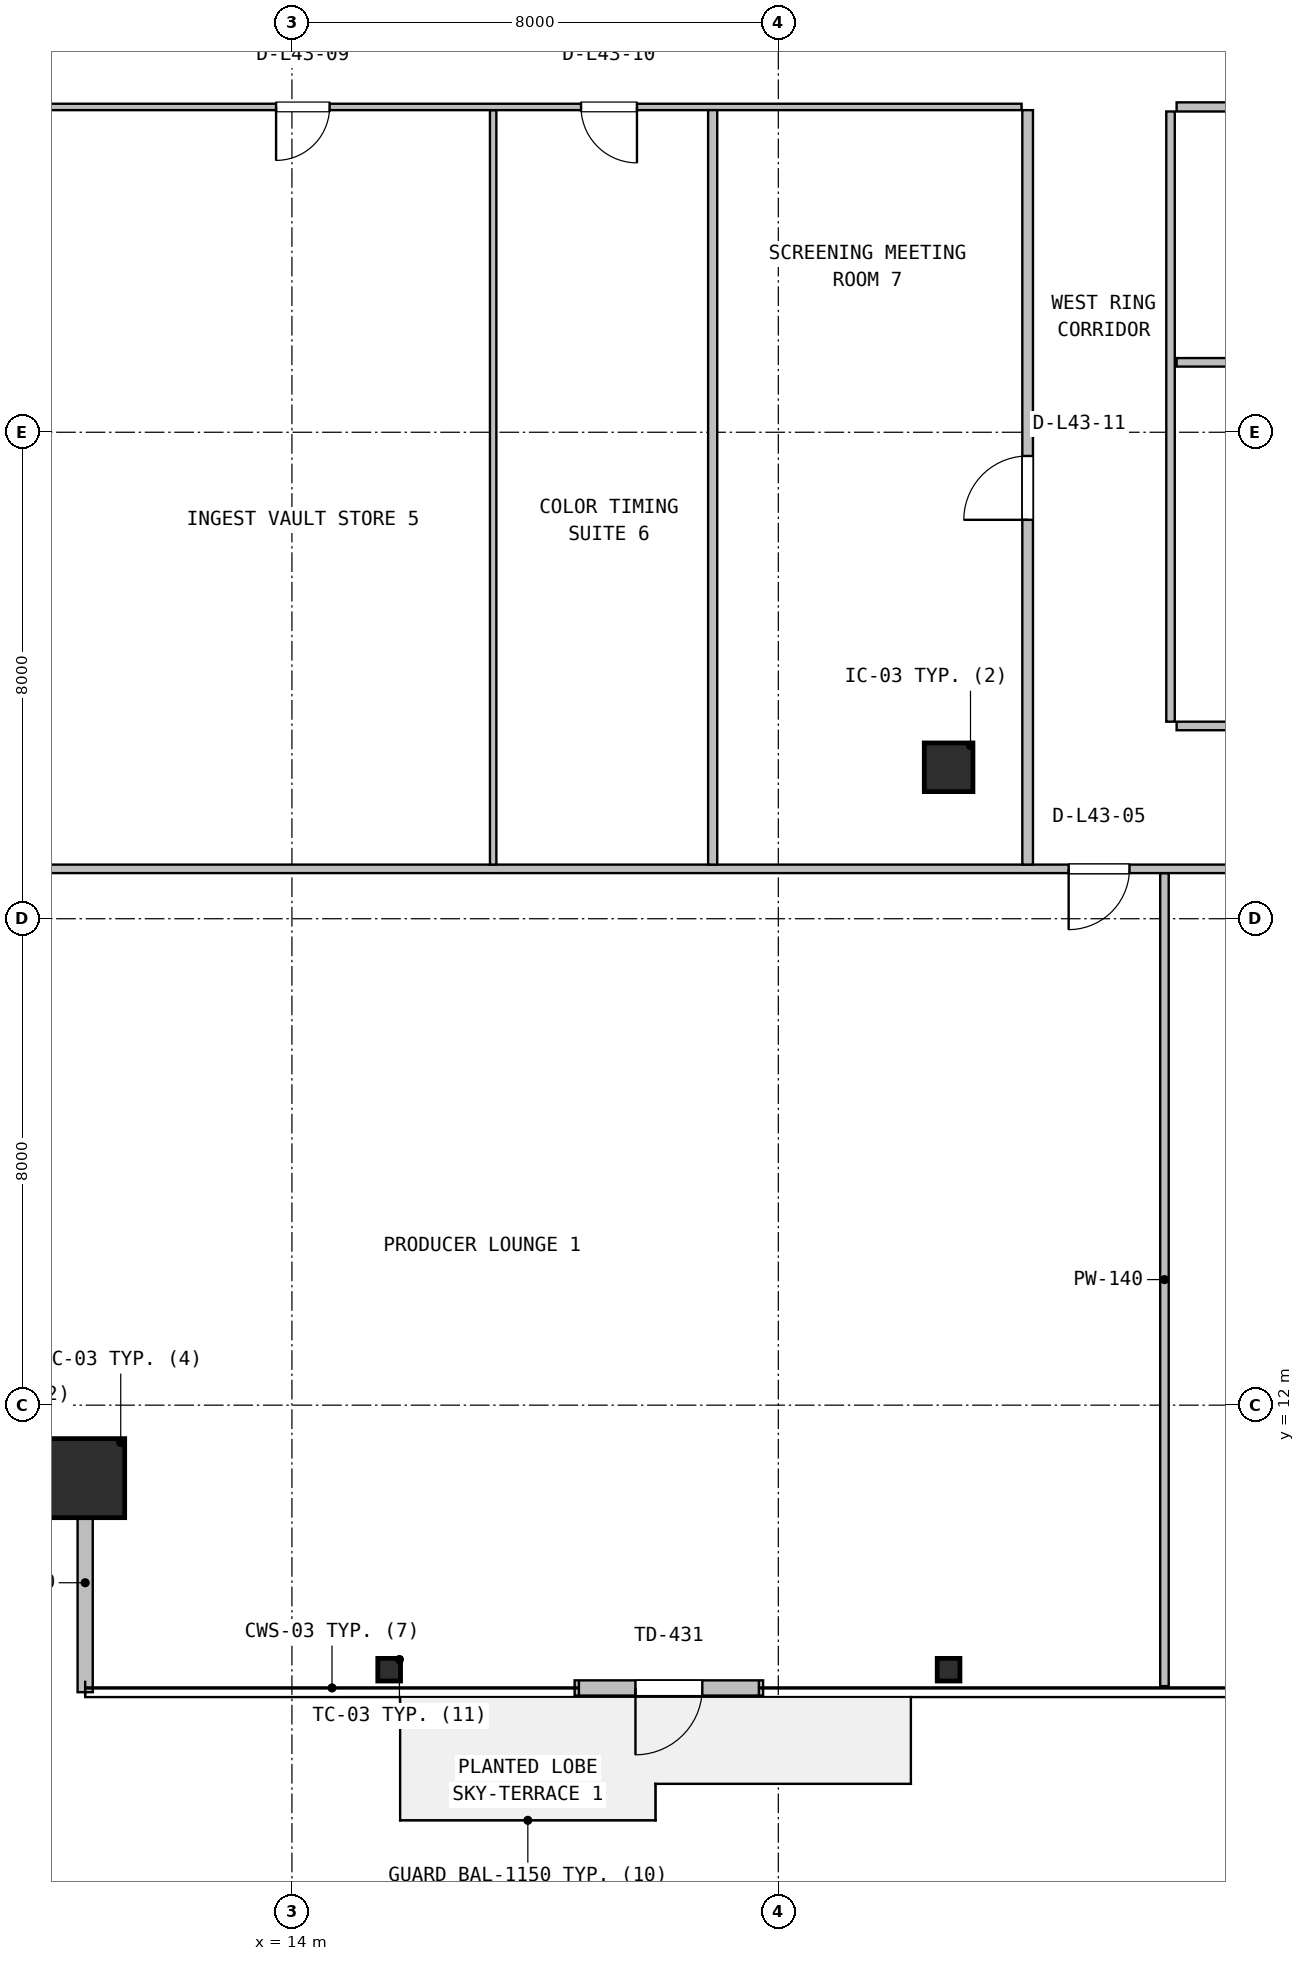
"""IFC4 building model, lengths in metres.
Left out: names, types, materials, properties, quantities, classifications, styles, units other than length and angle.
Written with IfcOpenShell. Run it as: python <this file> out.ifc"""

import sys

from ifc_helpers import new_model, si_unit, direction, frame, frame_2d, origin, origin_2d, place, context, subcontext, project, spatial, rectangle, hollow_rectangle, i_section, extrude, source, transform, mapped, element, fill, save


model = new_model("IFC4")
c1 = context("Model", 3, precision=1e-05, world=origin(), true_north=direction((0.0, 1.0)))
c2 = subcontext(c1, "Body", "Model", "MODEL_VIEW")
j1 = project(units=[si_unit("LENGTHUNIT", "METRE"), si_unit("PLANEANGLEUNIT", "RADIAN")], contexts=[c1])
p1 = place(None, origin())
s1 = spatial("IfcSite", under=j1, at=p1, CompositionType="ELEMENT")
p2 = place(p1, origin())
s2 = spatial("IfcBuilding", under=s1, at=p2, CompositionType="ELEMENT")
p3 = place(p2, frame((0.0, 0.0, 176.2)))
s3 = spatial("IfcBuildingStorey", under=s2, at=p3, CompositionType="ELEMENT", Elevation=176.2)
m1 = source(origin(), c2, "Body", "SweptSolid", [
    extrude(hollow_rectangle(XDim=1.3, YDim=1.3, WallThickness=0.05, at=origin_2d()), origin(), (0.0, 0.0, 1.0), 3.8),
])
p4 = place(p3, frame((10.6, 10.8, 0.0), z_axis=(0.0, 0.0, 1.0), x_axis=(1.0, 0.0, 0.0)))
e1 = element("IfcColumn", 1, at=p4, inside=s3, PredefinedType="COLUMN", context=c2, shape_type="MappedRepresentation", body=[
    mapped(m1, transform((0.0, 0.0, 0.0), x_axis=(1.0, 0.0, 0.0), y_axis=(0.0, 1.0, 0.0), z_axis=(0.0, 0.0, 1.0), scale=1.0)),
])
m2 = source(origin(), c2, "Body", "SweptSolid", [
    extrude(i_section(OverallWidth=0.374, OverallDepth=0.372, WebThickness=0.016, FlangeThickness=0.026, FilletRadius=0.016, at=origin_2d()), origin(), (0.0, 0.0, 1.0), 3.8),
])
for number, where, z_axis, x_axis in (
    (2, (15.6, 7.65, 0.0), (0.0, 0.0, 1.0), (1.0, 0.0, 0.0)),
    (3, (24.8, 7.65, 0.0), (0.0, 0.0, 1.0), (1.0, 0.0, 0.0)),
):
    element("IfcColumn", number, at=place(p3, frame(where, z_axis=z_axis, x_axis=x_axis)), inside=s3, PredefinedType="COLUMN", context=c2, shape_type="MappedRepresentation", body=[
        mapped(m2, transform((0.0, 0.0, 0.0), x_axis=(1.0, 0.0, 0.0), y_axis=(0.0, 1.0, 0.0), z_axis=(0.0, 0.0, 1.0), scale=1.0)),
    ])
m3 = source(origin(), c2, "Body", "SweptSolid", [
    extrude(rectangle(XDim=0.8, YDim=0.8, at=origin_2d()), origin(), (0.0, 0.0, 1.0), 3.8),
])
p5 = place(p3, frame((24.8, 22.49, 0.0), z_axis=(0.0, 0.0, 1.0), x_axis=(1.0, 0.0, 0.0)))
e4 = element("IfcColumn", 4, at=p5, inside=s3, PredefinedType="COLUMN", context=c2, shape_type="MappedRepresentation", body=[
    mapped(m3, transform((0.0, 0.0, 0.0), x_axis=(1.0, 0.0, 0.0), y_axis=(0.0, 1.0, 0.0), z_axis=(0.0, 0.0, 1.0), scale=1.0)),
])
p6 = place(p3, frame((18.65, 7.35, 0.0), z_axis=(0.0, 0.0, 1.0), x_axis=(1.0, 0.0, 0.0)))
e5 = element("IfcWall", 5, at=p6, inside=s3, PredefinedType="SOLIDWALL", context=c2, shape_type="SweptSolid", body=[
    extrude(rectangle(XDim=3.1, YDim=0.25, at=frame_2d((1.55, 0.0))), origin(), (0.0, 0.0, 1.0), 3.53),
])
p7 = place(p6, frame((1.0, 0.0, 0.0)))
e6 = element("IfcOpeningElement", 6, at=p7, cuts=e5, PredefinedType="OPENING", context=c2, shape_type="SweptSolid", body=[
    extrude(rectangle(XDim=1.1, YDim=2.15, at=frame_2d((0.55, 1.075))), frame((0.0, 0.135, 0.0), z_axis=(0.0, -1.0, 0.0), x_axis=(1.0, 0.0, 0.0)), (0.0, 0.0, 1.0), 0.27),
])
p8 = place(p3, frame((10.6, 7.28, 0.0), z_axis=(0.0, 0.0, 1.0), x_axis=(0.0, 1.0, 0.0)))
e7 = element("IfcWall", 7, at=p8, inside=s3, PredefinedType="SOLIDWALL", context=c2, shape_type="SweptSolid", body=[
    extrude(rectangle(XDim=3.6, YDim=0.25, at=frame_2d((1.8, 0.0))), origin(), (0.0, 0.0, 1.0), 3.108),
])
p9 = place(p3, frame((28.35, 7.38, 0.0), z_axis=(0.0, 0.0, 1.0), x_axis=(0.0, 1.0, 0.0)))
e8 = element("IfcWall", 8, at=p9, inside=s3, PredefinedType="PARTITIONING", context=c2, shape_type="SweptSolid", body=[
    extrude(rectangle(XDim=13.37, YDim=0.14, at=frame_2d((6.685, 0.0))), origin(), (0.0, 0.0, 1.0), 3.108),
])
p10 = place(p3, frame((7.18, 20.82, 0.0), z_axis=(0.0, 0.0, 1.0), x_axis=(1.0, 0.0, 0.0)))
e9 = element("IfcWall", 9, at=p10, inside=s3, PredefinedType="PARTITIONING", context=c2, shape_type="SweptSolid", body=[
    extrude(rectangle(XDim=53.64, YDim=0.14, at=frame_2d((26.82, 0.0))), origin(), (0.0, 0.0, 1.0), 2.909),
])
p11 = place(p10, frame((19.595, 0.0, 0.0)))
e10 = element("IfcOpeningElement", 10, at=p11, cuts=e9, PredefinedType="OPENING", context=c2, shape_type="SweptSolid", body=[
    extrude(rectangle(XDim=1.0, YDim=2.1, at=frame_2d((0.5, 1.05))), frame((0.0, 0.08, 0.0), z_axis=(0.0, -1.0, 0.0), x_axis=(1.0, 0.0, 0.0)), (0.0, 0.0, 1.0), 0.16),
])
p12 = place(p10, frame((24.15, 0.0, 0.0)))
e11 = element("IfcOpeningElement", 11, at=p12, cuts=e9, PredefinedType="OPENING", context=c2, shape_type="SweptSolid", body=[
    extrude(rectangle(XDim=0.88, YDim=2.06, at=frame_2d((0.44, 1.03))), frame((0.0, 0.08, 0.0), z_axis=(0.0, -1.0, 0.0), x_axis=(1.0, 0.0, 0.0)), (0.0, 0.0, 1.0), 0.16),
])
p13 = place(p10, frame((32.42, 0.0, 0.0)))
e12 = element("IfcOpeningElement", 12, at=p13, cuts=e9, PredefinedType="OPENING", context=c2, shape_type="SweptSolid", body=[
    extrude(rectangle(XDim=0.88, YDim=2.06, at=frame_2d((0.44, 1.03))), frame((0.0, 0.08, 0.0), z_axis=(0.0, -1.0, 0.0), x_axis=(1.0, 0.0, 0.0)), (0.0, 0.0, 1.0), 0.16),
])
p14 = place(p10, frame((38.545, 0.0, 0.0)))
e13 = element("IfcOpeningElement", 13, at=p14, cuts=e9, PredefinedType="OPENING", context=c2, shape_type="SweptSolid", body=[
    extrude(rectangle(XDim=0.88, YDim=2.06, at=frame_2d((0.44, 1.03))), frame((0.0, 0.08, 0.0), z_axis=(0.0, -1.0, 0.0), x_axis=(1.0, 0.0, 0.0)), (0.0, 0.0, 1.0), 0.16),
])
p15 = place(p3, frame((17.31, 20.89, 0.0), z_axis=(0.0, 0.0, 1.0), x_axis=(0.0, 1.0, 0.0)))
e14 = element("IfcWall", 14, at=p15, inside=s3, PredefinedType="PARTITIONING", context=c2, shape_type="SweptSolid", body=[
    extrude(rectangle(XDim=12.407, YDim=0.105, at=frame_2d((6.204, 0.0))), origin(), (0.0, 0.0, 1.0), 3.222),
])
p16 = place(p3, frame((7.18, 33.35, 0.0), z_axis=(0.0, 0.0, 1.0), x_axis=(1.0, 0.0, 0.0)))
e15 = element("IfcWall", 15, at=p16, inside=s3, PredefinedType="PARTITIONING", context=c2, shape_type="SweptSolid", body=[
    extrude(rectangle(XDim=18.82, YDim=0.105, at=frame_2d((9.41, 0.0))), origin(), (0.0, 0.0, 1.0), 2.909),
])
p17 = place(p16, frame((6.56, 0.0, 0.0)))
e16 = element("IfcOpeningElement", 16, at=p17, cuts=e15, PredefinedType="OPENING", context=c2, shape_type="SweptSolid", body=[
    extrude(rectangle(XDim=0.88, YDim=2.06, at=frame_2d((0.44, 1.03))), frame((0.0, 0.062, 0.0), z_axis=(0.0, -1.0, 0.0), x_axis=(1.0, 0.0, 0.0)), (0.0, 0.0, 1.0), 0.125),
])
p18 = place(p16, frame((11.575, 0.0, 0.0)))
e17 = element("IfcOpeningElement", 17, at=p18, cuts=e15, PredefinedType="OPENING", context=c2, shape_type="SweptSolid", body=[
    extrude(rectangle(XDim=0.92, YDim=2.08, at=frame_2d((0.46, 1.04))), frame((0.0, 0.062, 0.0), z_axis=(0.0, -1.0, 0.0), x_axis=(1.0, 0.0, 0.0)), (0.0, 0.0, 1.0), 0.125),
])
p19 = place(p3, frame((20.92, 20.89, 0.0), z_axis=(0.0, 0.0, 1.0), x_axis=(0.0, 1.0, 0.0)))
e18 = element("IfcWall", 18, at=p19, inside=s3, PredefinedType="PARTITIONING", context=c2, shape_type="SweptSolid", body=[
    extrude(rectangle(XDim=12.407, YDim=0.15, at=frame_2d((6.204, 0.0))), origin(), (0.0, 0.0, 1.0), 3.222),
])
p20 = place(p3, frame((26.1, 20.89, 0.0), z_axis=(0.0, 0.0, 1.0), x_axis=(0.0, 1.0, 0.0)))
e19 = element("IfcWall", 19, at=p20, inside=s3, PredefinedType="PARTITIONING", context=c2, shape_type="SweptSolid", body=[
    extrude(rectangle(XDim=12.407, YDim=0.175, at=frame_2d((6.204, 0.0))), origin(), (0.0, 0.0, 1.0), 2.909),
])
p21 = place(p20, frame((5.67, 0.0, 0.0)))
e20 = element("IfcOpeningElement", 20, at=p21, cuts=e19, PredefinedType="OPENING", context=c2, shape_type="SweptSolid", body=[
    extrude(rectangle(XDim=1.05, YDim=2.1, at=frame_2d((0.525, 1.05))), frame((0.0, 0.098, 0.0), z_axis=(0.0, -1.0, 0.0), x_axis=(1.0, 0.0, 0.0)), (0.0, 0.0, 1.0), 0.195),
])
p22 = place(p3, frame((28.55, 23.17, 0.0), z_axis=(0.0, 0.0, 1.0), x_axis=(1.0, 0.0, 0.0)))
e21 = element("IfcWall", 21, at=p22, inside=s3, PredefinedType="PARTITIONING", context=c2, shape_type="SweptSolid", body=[
    extrude(rectangle(XDim=16.34, YDim=0.14, at=frame_2d((8.17, 0.0))), origin(), (0.0, 0.0, 1.0), 2.909),
])
p23 = place(p22, frame((7.67, 0.0, 0.0)))
e22 = element("IfcOpeningElement", 22, at=p23, cuts=e21, PredefinedType="OPENING", context=c2, shape_type="SweptSolid", body=[
    extrude(rectangle(XDim=1.0, YDim=2.1, at=frame_2d((0.5, 1.05))), frame((0.0, 0.08, 0.0), z_axis=(0.0, -1.0, 0.0), x_axis=(1.0, 0.0, 0.0)), (0.0, 0.0, 1.0), 0.16),
])
p24 = place(p3, frame((28.55, 29.15, 0.0), z_axis=(0.0, 0.0, 1.0), x_axis=(1.0, 0.0, 0.0)))
e23 = element("IfcWall", 23, at=p24, inside=s3, PredefinedType="PARTITIONING", context=c2, shape_type="SweptSolid", body=[
    extrude(rectangle(XDim=16.34, YDim=0.14, at=frame_2d((8.17, 0.0))), origin(), (0.0, 0.0, 1.0), 2.909),
])
p25 = place(p3, frame((28.45, 23.24, 0.0), z_axis=(0.0, 0.0, 1.0), x_axis=(0.0, 1.0, 0.0)))
e24 = element("IfcWall", 24, at=p25, inside=s3, PredefinedType="PARTITIONING", context=c2, shape_type="SweptSolid", body=[
    extrude(rectangle(XDim=10.035, YDim=0.14, at=frame_2d((5.018, 0.0))), origin(), (0.0, 0.0, 1.0), 3.222),
])
p26 = place(p3, frame((28.55, 33.35, 0.0), z_axis=(0.0, 0.0, 1.0), x_axis=(1.0, 0.0, 0.0)))
e25 = element("IfcWall", 25, at=p26, inside=s3, PredefinedType="PARTITIONING", context=c2, shape_type="SweptSolid", body=[
    extrude(rectangle(XDim=16.34, YDim=0.15, at=frame_2d((8.17, 0.0))), origin(), (0.0, 0.0, 1.0), 2.909),
])
p27 = place(p26, frame((7.73, 0.0, 0.0)))
e26 = element("IfcOpeningElement", 26, at=p27, cuts=e25, PredefinedType="OPENING", context=c2, shape_type="SweptSolid", body=[
    extrude(rectangle(XDim=0.88, YDim=2.06, at=frame_2d((0.44, 1.03))), frame((0.0, 0.085, 0.0), z_axis=(0.0, -1.0, 0.0), x_axis=(1.0, 0.0, 0.0)), (0.0, 0.0, 1.0), 0.17),
])
m4 = source(origin(), c2, "Body", "SweptSolid", [
    extrude(rectangle(XDim=1.1, YDim=2.15, at=frame_2d((0.55, 1.075))), frame((0.0, 0.025, 0.0), z_axis=(0.0, -1.0, 0.0), x_axis=(1.0, 0.0, 0.0)), (0.0, 0.0, 1.0), 0.05),
])
p28 = place(p7, frame((1.1, 0.0, 0.0), z_axis=(0.0, 0.0, 1.0), x_axis=(-1.0, 0.0, 0.0)))
e27 = element("IfcDoor", 27, at=p28, inside=s3, OperationType="SINGLE_SWING_LEFT", PredefinedType="DOOR", context=c2, shape_type="MappedRepresentation", body=[
    mapped(m4, transform((0.0, 0.0, 0.0), x_axis=(1.0, 0.0, 0.0), y_axis=(0.0, 1.0, 0.0), z_axis=(0.0, 0.0, 1.0), scale=1.0)),
])
fill(e6, e27)
m5 = source(origin(), c2, "Body", "SweptSolid", [
    extrude(rectangle(XDim=1.0, YDim=2.1, at=frame_2d((0.5, 1.05))), frame((0.0, 0.025, 0.0), z_axis=(0.0, -1.0, 0.0), x_axis=(1.0, 0.0, 0.0)), (0.0, 0.0, 1.0), 0.05),
])
p29 = place(p11, frame((1.0, 0.0, 0.0), z_axis=(0.0, 0.0, 1.0), x_axis=(-1.0, 0.0, 0.0)))
e28 = element("IfcDoor", 28, at=p29, inside=s3, OperationType="SINGLE_SWING_LEFT", PredefinedType="DOOR", context=c2, shape_type="MappedRepresentation", body=[
    mapped(m5, transform((0.0, 0.0, 0.0), x_axis=(1.0, 0.0, 0.0), y_axis=(0.0, 1.0, 0.0), z_axis=(0.0, 0.0, 1.0), scale=1.0)),
])
fill(e10, e28)
m6 = source(origin(), c2, "Body", "SweptSolid", [
    extrude(rectangle(XDim=0.88, YDim=2.06, at=frame_2d((0.44, 1.03))), frame((0.0, 0.025, 0.0), z_axis=(0.0, -1.0, 0.0), x_axis=(1.0, 0.0, 0.0)), (0.0, 0.0, 1.0), 0.05),
])
p30 = place(p17, frame((0.88, 0.0, 0.0), z_axis=(0.0, 0.0, 1.0), x_axis=(-1.0, 0.0, 0.0)))
e29 = element("IfcDoor", 29, at=p30, inside=s3, OperationType="SINGLE_SWING_LEFT", PredefinedType="DOOR", context=c2, shape_type="MappedRepresentation", body=[
    mapped(m6, transform((0.0, 0.0, 0.0), x_axis=(1.0, 0.0, 0.0), y_axis=(0.0, 1.0, 0.0), z_axis=(0.0, 0.0, 1.0), scale=1.0)),
])
fill(e16, e29)
m7 = source(origin(), c2, "Body", "SweptSolid", [
    extrude(rectangle(XDim=0.92, YDim=2.08, at=frame_2d((0.46, 1.04))), frame((0.0, 0.025, 0.0), z_axis=(0.0, -1.0, 0.0), x_axis=(1.0, 0.0, 0.0)), (0.0, 0.0, 1.0), 0.05),
])
p31 = place(p18, frame((0.92, 0.0, 0.0), z_axis=(0.0, 0.0, 1.0), x_axis=(-1.0, 0.0, 0.0)))
e30 = element("IfcDoor", 30, at=p31, inside=s3, OperationType="SINGLE_SWING_RIGHT", PredefinedType="DOOR", context=c2, shape_type="MappedRepresentation", body=[
    mapped(m7, transform((0.0, 0.0, 0.0), x_axis=(1.0, 0.0, 0.0), y_axis=(0.0, 1.0, 0.0), z_axis=(0.0, 0.0, 1.0), scale=1.0)),
])
fill(e17, e30)
m8 = source(origin(), c2, "Body", "SweptSolid", [
    extrude(rectangle(XDim=1.05, YDim=2.1, at=frame_2d((0.525, 1.05))), frame((0.0, 0.025, 0.0), z_axis=(0.0, -1.0, 0.0), x_axis=(1.0, 0.0, 0.0)), (0.0, 0.0, 1.0), 0.05),
])
p32 = place(p21, origin())
e31 = element("IfcDoor", 31, at=p32, inside=s3, OperationType="SINGLE_SWING_LEFT", PredefinedType="DOOR", context=c2, shape_type="MappedRepresentation", body=[
    mapped(m8, transform((0.0, 0.0, 0.0), x_axis=(1.0, 0.0, 0.0), y_axis=(0.0, 1.0, 0.0), z_axis=(0.0, 0.0, 1.0), scale=1.0)),
])
fill(e20, e31)
save(model, sys.argv[1])
